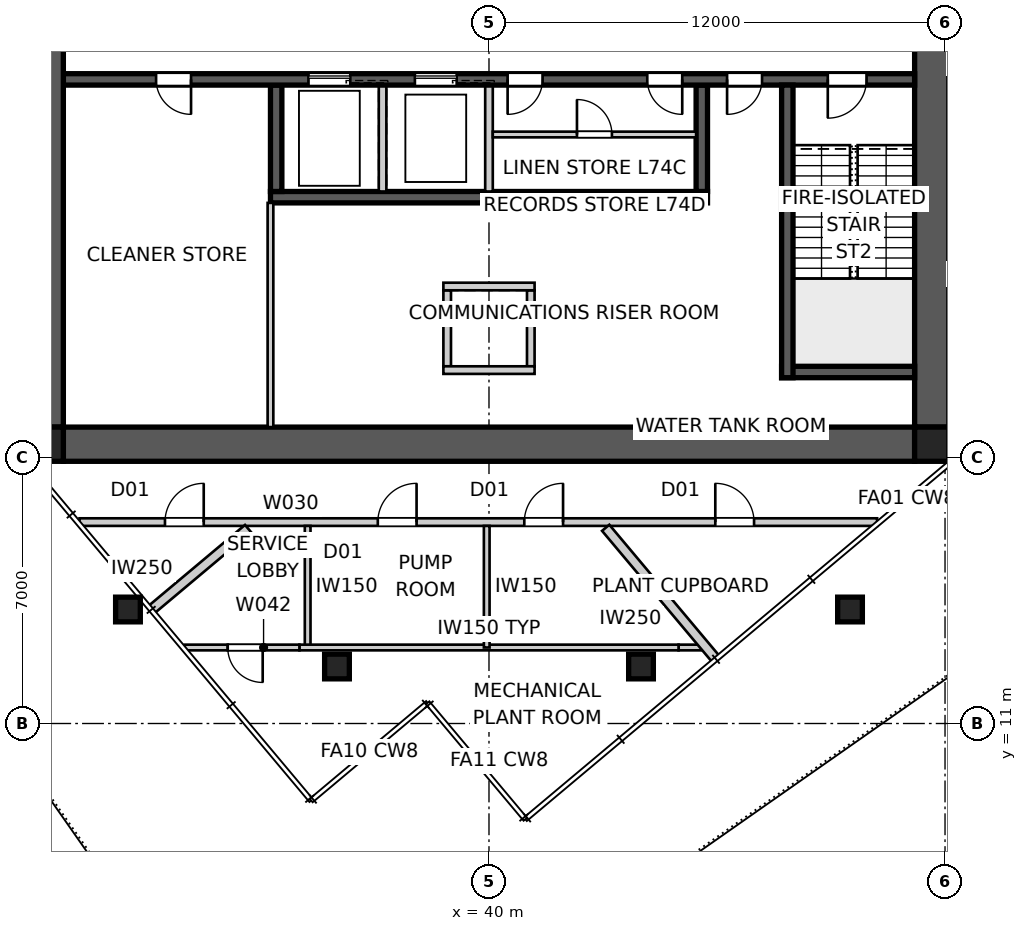
"""IFC4 building model, lengths in metres.
Left out: names, types, materials, properties, quantities, classifications, styles, units other than length and angle.
Written with IfcOpenShell. Run it as: python <this file> out.ifc"""

import sys

from ifc_helpers import new_model, si_unit, direction, frame, frame_2d, origin, origin_2d, place, context, subcontext, project, spatial, polyline, rectangle, outline, extrude, element, fill, save


model = new_model("IFC4")
c1 = context("Model", 3, precision=1e-05, world=origin(), true_north=direction((0.0, 1.0)))
c2 = subcontext(c1, "Body", "Model", "MODEL_VIEW")
j1 = project(units=[si_unit("LENGTHUNIT", "METRE"), si_unit("PLANEANGLEUNIT", "RADIAN")], contexts=[c1])
p1 = place(None, origin())
s1 = spatial("IfcSite", under=j1, at=p1, CompositionType="ELEMENT")
p2 = place(p1, origin())
s2 = spatial("IfcBuilding", under=s1, at=p2, CompositionType="ELEMENT")
p3 = place(p2, frame((0.0, 0.0, 267.6)))
s3 = spatial("IfcBuildingStorey", under=s2, at=p3, CompositionType="ELEMENT", Elevation=267.6)
p4 = place(p3, frame((51.2, 18.35, 0.0), z_axis=(0.0, 0.0, 1.0), x_axis=(-1.0, 0.0, 0.0)))
e1 = element("IfcWall", 1, at=p4, inside=s3, PredefinedType="SHEAR", context=c2, shape_type="SweptSolid", body=[
    extrude(outline(polyline([(0.0, -0.45), (22.4, -0.45), (22.4, -0.025), (22.85, -0.025), (22.85, 0.025), (22.4, 0.025), (22.4, 0.45), (0.0, 0.45), (0.0, 0.025), (-0.45, 0.025), (-0.45, -0.025), (0.0, -0.025), (0.0, -0.45)])), origin(), (0.0, 0.0, 1.0), 5.0),
])
p5 = place(p3, frame((51.65, 18.8, 0.0), z_axis=(0.0, 0.0, 1.0), x_axis=(0.0, 1.0, 0.0)))
e2 = element("IfcWall", 2, at=p5, inside=s3, PredefinedType="SHEAR", context=c2, shape_type="SweptSolid", body=[
    extrude(outline(polyline([(0.0, -0.45), (22.4, -0.45), (22.4, -0.025), (22.85, -0.025), (22.85, 0.025), (22.4, 0.025), (22.4, 0.45), (0.0, 0.45), (0.0, 0.025), (-0.45, 0.025), (-0.45, -0.025), (0.0, -0.025), (0.0, -0.45)])), origin(), (0.0, 0.0, 1.0), 5.0),
])
p6 = place(p5, frame((11.14, 0.0, 0.0)))
e3 = element("IfcOpeningElement", 3, at=p6, cuts=e2, PredefinedType="OPENING", context=c2, shape_type="SweptSolid", body=[
    extrude(rectangle(XDim=1.02, YDim=2.4, at=frame_2d((0.51, 1.2))), frame((0.0, 0.46, 0.0), z_axis=(0.0, -1.0, 0.0), x_axis=(1.0, 0.0, 0.0)), (0.0, 0.0, 1.0), 0.92),
])
p7 = place(p3, frame((28.35, 41.2, 0.0), z_axis=(0.0, 0.0, 1.0), x_axis=(0.0, -1.0, 0.0)))
e4 = element("IfcWall", 4, at=p7, inside=s3, PredefinedType="SHEAR", context=c2, shape_type="SweptSolid", body=[
    extrude(outline(polyline([(0.0, -0.45), (22.4, -0.45), (22.4, -0.025), (22.85, -0.025), (22.85, 0.025), (22.4, 0.025), (22.4, 0.45), (0.0, 0.45), (0.0, 0.025), (-0.45, 0.025), (-0.45, -0.025), (0.0, -0.025), (0.0, -0.45)])), origin(), (0.0, 0.0, 1.0), 5.0),
])
p8 = place(p7, frame((11.14, 0.0, 0.0)))
e5 = element("IfcOpeningElement", 5, at=p8, cuts=e4, PredefinedType="OPENING", context=c2, shape_type="SweptSolid", body=[
    extrude(rectangle(XDim=1.02, YDim=2.4, at=frame_2d((0.51, 1.2))), frame((0.0, 0.46, 0.0), z_axis=(0.0, -1.0, 0.0), x_axis=(1.0, 0.0, 0.0)), (0.0, 0.0, 1.0), 0.92),
])
p9 = place(p3, frame((51.2, 27.95, 0.0), z_axis=(0.0, 0.0, 1.0), x_axis=(-1.0, 0.0, 0.0)))
e6 = element("IfcWall", 6, at=p9, inside=s3, PredefinedType="SHEAR", context=c2, shape_type="SweptSolid", body=[
    extrude(rectangle(XDim=22.4, YDim=0.3, at=frame_2d((11.2, 0.0))), origin(), (0.0, 0.0, 1.0), 5.0),
])
p10 = place(p9, frame((19.04, 0.0, 0.0)))
e7 = element("IfcOpeningElement", 7, at=p10, cuts=e6, PredefinedType="OPENING", context=c2, shape_type="SweptSolid", body=[
    extrude(rectangle(XDim=0.92, YDim=2.1, at=frame_2d((0.46, 1.05))), frame((0.0, 0.16, 0.0), z_axis=(0.0, -1.0, 0.0), x_axis=(1.0, 0.0, 0.0)), (0.0, 0.0, 1.0), 0.32),
])
p11 = place(p9, frame((1.265, 0.0, 0.0)))
e8 = element("IfcOpeningElement", 8, at=p11, cuts=e6, PredefinedType="OPENING", context=c2, shape_type="SweptSolid", body=[
    extrude(rectangle(XDim=1.02, YDim=2.1, at=frame_2d((0.51, 1.05))), frame((0.0, 0.16, 0.0), z_axis=(0.0, -1.0, 0.0), x_axis=(1.0, 0.0, 0.0)), (0.0, 0.0, 1.0), 0.32),
])
p12 = place(p9, frame((4.015, 0.0, 0.0)))
e9 = element("IfcOpeningElement", 9, at=p12, cuts=e6, PredefinedType="OPENING", context=c2, shape_type="SweptSolid", body=[
    extrude(rectangle(XDim=0.92, YDim=2.1, at=frame_2d((0.46, 1.05))), frame((0.0, 0.16, 0.0), z_axis=(0.0, -1.0, 0.0), x_axis=(1.0, 0.0, 0.0)), (0.0, 0.0, 1.0), 0.32),
])
p13 = place(p9, frame((9.79, 0.0, 0.0)))
e10 = element("IfcOpeningElement", 10, at=p13, cuts=e6, PredefinedType="OPENING", context=c2, shape_type="SweptSolid", body=[
    extrude(rectangle(XDim=0.92, YDim=2.1, at=frame_2d((0.46, 1.05))), frame((0.0, 0.16, 0.0), z_axis=(0.0, -1.0, 0.0), x_axis=(1.0, 0.0, 0.0)), (0.0, 0.0, 1.0), 0.32),
])
p14 = place(p9, frame((6.115, 0.0, 0.0)))
e11 = element("IfcOpeningElement", 11, at=p14, cuts=e6, PredefinedType="OPENING", context=c2, shape_type="SweptSolid", body=[
    extrude(rectangle(XDim=0.92, YDim=2.1, at=frame_2d((0.46, 1.05))), frame((0.0, 0.16, 0.0), z_axis=(0.0, -1.0, 0.0), x_axis=(1.0, 0.0, 0.0)), (0.0, 0.0, 1.0), 0.32),
])
p15 = place(p9, frame((12.05, 0.0, 0.0)))
e12 = element("IfcOpeningElement", 12, at=p15, cuts=e6, PredefinedType="OPENING", context=c2, shape_type="SweptSolid", body=[
    extrude(rectangle(XDim=1.1, YDim=2.1, at=frame_2d((0.55, 1.05))), frame((0.0, 0.16, 0.0), z_axis=(0.0, -1.0, 0.0), x_axis=(1.0, 0.0, 0.0)), (0.0, 0.0, 1.0), 0.32),
])
p16 = place(p9, frame((14.85, 0.0, 0.0)))
e13 = element("IfcOpeningElement", 13, at=p16, cuts=e6, PredefinedType="OPENING", context=c2, shape_type="SweptSolid", body=[
    extrude(rectangle(XDim=1.1, YDim=2.1, at=frame_2d((0.55, 1.05))), frame((0.0, 0.16, 0.0), z_axis=(0.0, -1.0, 0.0), x_axis=(1.0, 0.0, 0.0)), (0.0, 0.0, 1.0), 0.32),
])
p17 = place(p3, frame((45.75, 24.85, 0.0), z_axis=(0.0, 0.0, 1.0), x_axis=(-1.0, 0.0, 0.0)))
e14 = element("IfcWall", 14, at=p17, inside=s3, PredefinedType="SHEAR", context=c2, shape_type="SweptSolid", body=[
    extrude(rectangle(XDim=11.5, YDim=0.3, at=frame_2d((5.75, 0.0))), origin(), (0.0, 0.0, 1.0), 5.0),
])
p18 = place(p3, frame((45.6, 27.8, 0.0), z_axis=(0.0, 0.0, 1.0), x_axis=(0.0, -1.0, 0.0)))
e15 = element("IfcWall", 15, at=p18, inside=s3, PredefinedType="SHEAR", context=c2, shape_type="SweptSolid", body=[
    extrude(rectangle(XDim=2.8, YDim=0.3, at=frame_2d((1.4, 0.0))), origin(), (0.0, 0.0, 1.0), 5.0),
])
for number, where, z_axis, x_axis in (
    (16, (40.0, 27.8, 0.0), (0.0, 0.0, 1.0), (0.0, -1.0, 0.0)),
    (17, (37.2, 27.8, 0.0), (0.0, 0.0, 1.0), (0.0, -1.0, 0.0)),
):
    element("IfcWall", number, at=place(p3, frame(where, z_axis=z_axis, x_axis=x_axis)), inside=s3, PredefinedType="SOLIDWALL", context=c2, shape_type="SweptSolid", body=[
        extrude(rectangle(XDim=2.8, YDim=0.2, at=frame_2d((1.4, 0.0))), origin(), (0.0, 0.0, 1.0), 5.0),
    ])
p19 = place(p3, frame((34.4, 27.8, 0.0), z_axis=(0.0, 0.0, 1.0), x_axis=(0.0, -1.0, 0.0)))
e18 = element("IfcWall", 18, at=p19, inside=s3, PredefinedType="SHEAR", context=c2, shape_type="SweptSolid", body=[
    extrude(rectangle(XDim=2.8, YDim=0.3, at=frame_2d((1.4, 0.0))), origin(), (0.0, 0.0, 1.0), 5.0),
])
p20 = place(p3, frame((47.85, 27.8, 0.0), z_axis=(0.0, 0.0, 1.0), x_axis=(0.0, -1.0, 0.0)))
e19 = element("IfcWall", 19, at=p20, inside=s3, PredefinedType="SHEAR", context=c2, shape_type="SweptSolid", body=[
    extrude(rectangle(XDim=7.7, YDim=0.3, at=frame_2d((3.85, 0.0))), origin(), (0.0, 0.0, 1.0), 5.0),
])
p21 = place(p3, frame((51.2, 20.25, 0.0), z_axis=(0.0, 0.0, 1.0), x_axis=(-1.0, 0.0, 0.0)))
e20 = element("IfcWall", 20, at=p21, inside=s3, PredefinedType="SHEAR", context=c2, shape_type="SweptSolid", body=[
    extrude(rectangle(XDim=3.5, YDim=0.3, at=frame_2d((1.75, 0.0))), origin(), (0.0, 0.0, 1.0), 5.0),
])
for number, where, z_axis, x_axis in (
    (21, (38.9, 22.4, 0.0), (0.0, 0.0, 1.0), (0.0, -1.0, 0.0)),
    (22, (41.1, 22.4, 0.0), (0.0, 0.0, 1.0), (0.0, -1.0, 0.0)),
):
    element("IfcWall", number, at=place(p3, frame(where, z_axis=z_axis, x_axis=x_axis)), inside=s3, PredefinedType="SOLIDWALL", context=c2, shape_type="SweptSolid", body=[
        extrude(rectangle(XDim=2.0, YDim=0.2, at=frame_2d((1.0, 0.0))), origin(), (0.0, 0.0, 1.0), 5.0),
    ])
for number, where, z_axis, x_axis in (
    (23, (38.8, 22.5, 0.0), (0.0, 0.0, 1.0), (1.0, 0.0, 0.0)),
    (24, (38.8, 20.3, 0.0), (0.0, 0.0, 1.0), (1.0, 0.0, 0.0)),
):
    element("IfcWall", number, at=place(p3, frame(where, z_axis=z_axis, x_axis=x_axis)), inside=s3, PredefinedType="SOLIDWALL", context=c2, shape_type="SweptSolid", body=[
        extrude(rectangle(XDim=2.4, YDim=0.2, at=frame_2d((1.2, 0.0))), origin(), (0.0, 0.0, 1.0), 5.0),
    ])
for number, where, z_axis, x_axis in (
    (25, (28.35, 18.35, 0.0), (0.0, 0.0, 1.0), (1.0, 0.0, 0.0)),
    (26, (51.65, 18.35, 0.0), (0.0, 0.0, 1.0), (1.0, 0.0, 0.0)),
):
    element("IfcColumn", number, at=place(p3, frame(where, z_axis=z_axis, x_axis=x_axis)), inside=s3, PredefinedType="COLUMN", context=c2, shape_type="SweptSolid", body=[
        extrude(rectangle(XDim=0.9, YDim=0.9, at=origin_2d()), origin(), (0.0, 0.0, 1.0), 5.0),
    ])
for number, where, z_axis, x_axis in (
    (27, (30.5, 14.0, 0.0), (0.0, 0.0, 1.0), (1.0, 0.0, 0.0)),
    (28, (36.0, 12.5, 0.0), (0.0, 0.0, 1.0), (1.0, 0.0, 0.0)),
    (29, (44.0, 12.5, 0.0), (0.0, 0.0, 1.0), (1.0, 0.0, 0.0)),
    (30, (49.5, 14.0, 0.0), (0.0, 0.0, 1.0), (1.0, 0.0, 0.0)),
):
    element("IfcColumn", number, at=place(p3, frame(where, z_axis=z_axis, x_axis=x_axis)), inside=s3, PredefinedType="COLUMN", context=c2, shape_type="SweptSolid", body=[
        extrude(rectangle(XDim=0.65, YDim=0.65, at=origin_2d()), origin(), (0.0, 0.0, 1.0), 5.0),
    ])
p22 = place(p3, frame((29.225, 16.3, 0.0), z_axis=(0.0, 0.0, 1.0), x_axis=(1.0, 0.0, 0.0)))
e31 = element("IfcWall", 31, at=p22, inside=s3, PredefinedType="PARTITIONING", context=c2, shape_type="SweptSolid", body=[
    extrude(rectangle(XDim=20.988, YDim=0.2, at=frame_2d((10.494, 0.0))), origin(), (0.0, 0.0, 1.0), 4.85),
])
p23 = place(p22, frame((16.729, 0.0, 0.0)))
e32 = element("IfcOpeningElement", 32, at=p23, cuts=e31, PredefinedType="OPENING", context=c2, shape_type="SweptSolid", body=[
    extrude(rectangle(XDim=1.02, YDim=2.34, at=frame_2d((0.51, 1.17))), frame((0.0, 0.11, 0.0), z_axis=(0.0, -1.0, 0.0), x_axis=(1.0, 0.0, 0.0)), (0.0, 0.0, 1.0), 0.22),
])
p24 = place(p22, frame((2.249, 0.0, 0.0)))
e33 = element("IfcOpeningElement", 33, at=p24, cuts=e31, PredefinedType="OPENING", context=c2, shape_type="SweptSolid", body=[
    extrude(rectangle(XDim=1.02, YDim=2.34, at=frame_2d((0.51, 1.17))), frame((0.0, 0.11, 0.0), z_axis=(0.0, -1.0, 0.0), x_axis=(1.0, 0.0, 0.0)), (0.0, 0.0, 1.0), 0.22),
])
p25 = place(p22, frame((7.849, 0.0, 0.0)))
e34 = element("IfcOpeningElement", 34, at=p25, cuts=e31, PredefinedType="OPENING", context=c2, shape_type="SweptSolid", body=[
    extrude(rectangle(XDim=1.02, YDim=2.34, at=frame_2d((0.51, 1.17))), frame((0.0, 0.11, 0.0), z_axis=(0.0, -1.0, 0.0), x_axis=(1.0, 0.0, 0.0)), (0.0, 0.0, 1.0), 0.22),
])
p26 = place(p22, frame((11.704, 0.0, 0.0)))
e35 = element("IfcOpeningElement", 35, at=p26, cuts=e31, PredefinedType="OPENING", context=c2, shape_type="SweptSolid", body=[
    extrude(rectangle(XDim=1.02, YDim=2.34, at=frame_2d((0.51, 1.17))), frame((0.0, 0.11, 0.0), z_axis=(0.0, -1.0, 0.0), x_axis=(1.0, 0.0, 0.0)), (0.0, 0.0, 1.0), 0.22),
])
p27 = place(p3, frame((45.974, 12.69, 0.0), z_axis=(0.0, 0.0, 1.0), x_axis=(-0.642796491962, 0.766036989917, 0.0)))
e36 = element("IfcWall", 36, at=p27, inside=s3, PredefinedType="PARTITIONING", context=c2, shape_type="SweptSolid", body=[
    extrude(rectangle(XDim=4.517, YDim=0.25, at=frame_2d((2.258, 0.0))), origin(), (0.0, 0.0, 1.0), 4.85),
])
p28 = place(p3, frame((31.111, 13.991, 0.0), z_axis=(0.0, 0.0, 1.0), x_axis=(0.766070357753, 0.642756724565, 0.0)))
e37 = element("IfcWall", 37, at=p28, inside=s3, PredefinedType="PARTITIONING", context=c2, shape_type="SweptSolid", body=[
    extrude(rectangle(XDim=3.328, YDim=0.25, at=frame_2d((1.664, 0.0))), origin(), (0.0, 0.0, 1.0), 4.85),
])
p29 = place(p3, frame((34.25, 18.8, 0.0), z_axis=(0.0, 0.0, 1.0), x_axis=(0.0, 1.0, 0.0)))
e38 = element("IfcWall", 38, at=p29, inside=s3, PredefinedType="SOLIDWALL", context=c2, shape_type="SweptSolid", body=[
    extrude(rectangle(XDim=5.9, YDim=0.15, at=frame_2d((2.95, 0.0))), origin(), (0.0, 0.0, 1.0), 4.85),
])
p30 = place(p3, frame((35.229, 16.2, 0.0), z_axis=(0.0, 0.0, 1.0), x_axis=(0.0, -1.0, 0.0)))
e39 = element("IfcWall", 39, at=p30, inside=s3, PredefinedType="SOLIDWALL", context=c2, shape_type="SweptSolid", body=[
    extrude(rectangle(XDim=3.2, YDim=0.15, at=frame_2d((1.6, 0.0))), origin(), (0.0, 0.0, 1.0), 4.85),
])
p31 = place(p3, frame((45.714, 13.0, 0.0), z_axis=(0.0, 0.0, 1.0), x_axis=(-1.0, 0.0, 0.0)))
e40 = element("IfcWall", 40, at=p31, inside=s3, PredefinedType="SOLIDWALL", context=c2, shape_type="SweptSolid", body=[
    extrude(rectangle(XDim=0.726, YDim=0.15, at=frame_2d((0.363, 0.0))), origin(), (0.0, 0.0, 1.0), 3.85),
])
p32 = place(p3, frame((44.988, 13.0, 0.0), z_axis=(0.0, 0.0, 1.0), x_axis=(-1.0, 0.0, 0.0)))
e41 = element("IfcWall", 41, at=p32, inside=s3, PredefinedType="SOLIDWALL", context=c2, shape_type="SweptSolid", body=[
    extrude(rectangle(XDim=9.977, YDim=0.15, at=frame_2d((4.988, 0.0))), origin(), (0.0, 0.0, 1.0), 4.85),
])
p33 = place(p3, frame((35.012, 13.0, 0.0), z_axis=(0.0, 0.0, 1.0), x_axis=(-1.0, 0.0, 0.0)))
e42 = element("IfcWall", 42, at=p33, inside=s3, PredefinedType="SOLIDWALL", context=c2, shape_type="SweptSolid", body=[
    extrude(rectangle(XDim=1.886, YDim=0.15, at=frame_2d((0.943, 0.0))), origin(), (0.0, 0.0, 1.0), 3.85),
])
p34 = place(p33, frame((0.966, 0.0, 0.0)))
e43 = element("IfcOpeningElement", 43, at=p34, cuts=e42, PredefinedType="OPENING", context=c2, shape_type="SweptSolid", body=[
    extrude(rectangle(XDim=0.92, YDim=2.1, at=frame_2d((0.46, 1.05))), frame((0.0, 0.085, 0.0), z_axis=(0.0, -1.0, 0.0), x_axis=(1.0, 0.0, 0.0)), (0.0, 0.0, 1.0), 0.17),
])
p35 = place(p3, frame((33.125, 13.0, 0.0), z_axis=(0.0, 0.0, 1.0), x_axis=(-1.0, 0.0, 0.0)))
e44 = element("IfcWall", 44, at=p35, inside=s3, PredefinedType="SOLIDWALL", context=c2, shape_type="SweptSolid", body=[
    extrude(rectangle(XDim=1.131, YDim=0.15, at=frame_2d((0.565, 0.0))), origin(), (0.0, 0.0, 1.0), 4.85),
])
p36 = place(p3, frame((39.94, 16.2, 0.0), z_axis=(0.0, 0.0, 1.0), x_axis=(0.0, -1.0, 0.0)))
e45 = element("IfcWall", 45, at=p36, inside=s3, PredefinedType="SOLIDWALL", context=c2, shape_type="SweptSolid", body=[
    extrude(rectangle(XDim=3.2, YDim=0.15, at=frame_2d((1.6, 0.0))), origin(), (0.0, 0.0, 1.0), 4.321),
])
p37 = place(p3, frame((40.1, 26.5, 0.0), z_axis=(0.0, 0.0, 1.0), x_axis=(1.0, 0.0, 0.0)))
e46 = element("IfcWall", 46, at=p37, inside=s3, PredefinedType="SOLIDWALL", context=c2, shape_type="SweptSolid", body=[
    extrude(rectangle(XDim=5.35, YDim=0.15, at=frame_2d((2.675, 0.0))), origin(), (0.0, 0.0, 1.0), 4.85),
])
p38 = place(p37, frame((2.215, 0.0, 0.0)))
e47 = element("IfcOpeningElement", 47, at=p38, cuts=e46, PredefinedType="OPENING", context=c2, shape_type="SweptSolid", body=[
    extrude(rectangle(XDim=0.92, YDim=2.1, at=frame_2d((0.46, 1.05))), frame((0.0, 0.085, 0.0), z_axis=(0.0, -1.0, 0.0), x_axis=(1.0, 0.0, 0.0)), (0.0, 0.0, 1.0), 0.17),
])
p39 = place(p10, origin())
e48 = element("IfcDoor", 48, at=p39, inside=s3, OperationType="SINGLE_SWING_LEFT", PredefinedType="DOOR", context=c2, shape_type="SweptSolid", body=[
    extrude(rectangle(XDim=0.92, YDim=2.1, at=frame_2d((0.46, 1.05))), frame((0.0, 0.025, 0.0), z_axis=(0.0, -1.0, 0.0), x_axis=(1.0, 0.0, 0.0)), (0.0, 0.0, 1.0), 0.05),
])
fill(e7, e48)
p40 = place(p11, origin())
e49 = element("IfcDoor", 49, at=p40, inside=s3, OperationType="SINGLE_SWING_RIGHT", PredefinedType="DOOR", context=c2, shape_type="SweptSolid", body=[
    extrude(rectangle(XDim=1.02, YDim=2.1, at=frame_2d((0.51, 1.05))), frame((0.0, 0.025, 0.0), z_axis=(0.0, -1.0, 0.0), x_axis=(1.0, 0.0, 0.0)), (0.0, 0.0, 1.0), 0.05),
])
fill(e8, e49)
p41 = place(p12, origin())
e50 = element("IfcDoor", 50, at=p41, inside=s3, OperationType="SINGLE_SWING_RIGHT", PredefinedType="DOOR", context=c2, shape_type="SweptSolid", body=[
    extrude(rectangle(XDim=0.92, YDim=2.1, at=frame_2d((0.46, 1.05))), frame((0.0, 0.025, 0.0), z_axis=(0.0, -1.0, 0.0), x_axis=(1.0, 0.0, 0.0)), (0.0, 0.0, 1.0), 0.05),
])
fill(e9, e50)
p42 = place(p23, origin())
e51 = element("IfcDoor", 51, at=p42, inside=s3, OperationType="SINGLE_SWING_LEFT", PredefinedType="DOOR", context=c2, shape_type="SweptSolid", body=[
    extrude(rectangle(XDim=1.02, YDim=2.34, at=frame_2d((0.51, 1.17))), frame((0.0, 0.025, 0.0), z_axis=(0.0, -1.0, 0.0), x_axis=(1.0, 0.0, 0.0)), (0.0, 0.0, 1.0), 0.05),
])
fill(e32, e51)
p43 = place(p24, origin())
e52 = element("IfcDoor", 52, at=p43, inside=s3, OperationType="SINGLE_SWING_RIGHT", PredefinedType="DOOR", context=c2, shape_type="SweptSolid", body=[
    extrude(rectangle(XDim=1.02, YDim=2.34, at=frame_2d((0.51, 1.17))), frame((0.0, 0.025, 0.0), z_axis=(0.0, -1.0, 0.0), x_axis=(1.0, 0.0, 0.0)), (0.0, 0.0, 1.0), 0.05),
])
fill(e33, e52)
p44 = place(p25, origin())
e53 = element("IfcDoor", 53, at=p44, inside=s3, OperationType="SINGLE_SWING_RIGHT", PredefinedType="DOOR", context=c2, shape_type="SweptSolid", body=[
    extrude(rectangle(XDim=1.02, YDim=2.34, at=frame_2d((0.51, 1.17))), frame((0.0, 0.025, 0.0), z_axis=(0.0, -1.0, 0.0), x_axis=(1.0, 0.0, 0.0)), (0.0, 0.0, 1.0), 0.05),
])
fill(e34, e53)
p45 = place(p26, origin())
e54 = element("IfcDoor", 54, at=p45, inside=s3, OperationType="SINGLE_SWING_RIGHT", PredefinedType="DOOR", context=c2, shape_type="SweptSolid", body=[
    extrude(rectangle(XDim=1.02, YDim=2.34, at=frame_2d((0.51, 1.17))), frame((0.0, 0.025, 0.0), z_axis=(0.0, -1.0, 0.0), x_axis=(1.0, 0.0, 0.0)), (0.0, 0.0, 1.0), 0.05),
])
fill(e35, e54)
p46 = place(p34, origin())
e55 = element("IfcDoor", 55, at=p46, inside=s3, OperationType="SINGLE_SWING_LEFT", PredefinedType="DOOR", context=c2, shape_type="SweptSolid", body=[
    extrude(rectangle(XDim=0.92, YDim=2.1, at=frame_2d((0.46, 1.05))), frame((0.0, 0.025, 0.0), z_axis=(0.0, -1.0, 0.0), x_axis=(1.0, 0.0, 0.0)), (0.0, 0.0, 1.0), 0.05),
])
fill(e43, e55)
p47 = place(p13, origin())
e56 = element("IfcDoor", 56, at=p47, inside=s3, OperationType="SINGLE_SWING_RIGHT", PredefinedType="DOOR", context=c2, shape_type="SweptSolid", body=[
    extrude(rectangle(XDim=0.92, YDim=2.1, at=frame_2d((0.46, 1.05))), frame((0.0, 0.025, 0.0), z_axis=(0.0, -1.0, 0.0), x_axis=(1.0, 0.0, 0.0)), (0.0, 0.0, 1.0), 0.05),
])
fill(e10, e56)
p48 = place(p14, origin())
e57 = element("IfcDoor", 57, at=p48, inside=s3, OperationType="SINGLE_SWING_LEFT", PredefinedType="DOOR", context=c2, shape_type="SweptSolid", body=[
    extrude(rectangle(XDim=0.92, YDim=2.1, at=frame_2d((0.46, 1.05))), frame((0.0, 0.025, 0.0), z_axis=(0.0, -1.0, 0.0), x_axis=(1.0, 0.0, 0.0)), (0.0, 0.0, 1.0), 0.05),
])
fill(e11, e57)
p49 = place(p38, origin())
e58 = element("IfcDoor", 58, at=p49, inside=s3, OperationType="SINGLE_SWING_LEFT", PredefinedType="DOOR", context=c2, shape_type="SweptSolid", body=[
    extrude(rectangle(XDim=0.92, YDim=2.1, at=frame_2d((0.46, 1.05))), frame((0.0, 0.025, 0.0), z_axis=(0.0, -1.0, 0.0), x_axis=(1.0, 0.0, 0.0)), (0.0, 0.0, 1.0), 0.05),
])
fill(e47, e58)
p50 = place(p15, origin())
e59 = element("IfcDoor", 59, at=p50, inside=s3, OperationType="SLIDING_TO_LEFT", PredefinedType="DOOR", context=c2, shape_type="SweptSolid", body=[
    extrude(rectangle(XDim=1.1, YDim=2.1, at=frame_2d((0.55, 1.05))), frame((0.0, 0.025, 0.0), z_axis=(0.0, -1.0, 0.0), x_axis=(1.0, 0.0, 0.0)), (0.0, 0.0, 1.0), 0.05),
])
fill(e12, e59)
p51 = place(p16, origin())
e60 = element("IfcDoor", 60, at=p51, inside=s3, OperationType="SLIDING_TO_LEFT", PredefinedType="DOOR", context=c2, shape_type="SweptSolid", body=[
    extrude(rectangle(XDim=1.1, YDim=2.1, at=frame_2d((0.55, 1.05))), frame((0.0, 0.025, 0.0), z_axis=(0.0, -1.0, 0.0), x_axis=(1.0, 0.0, 0.0)), (0.0, 0.0, 1.0), 0.05),
])
fill(e13, e60)
save(model, sys.argv[1])
